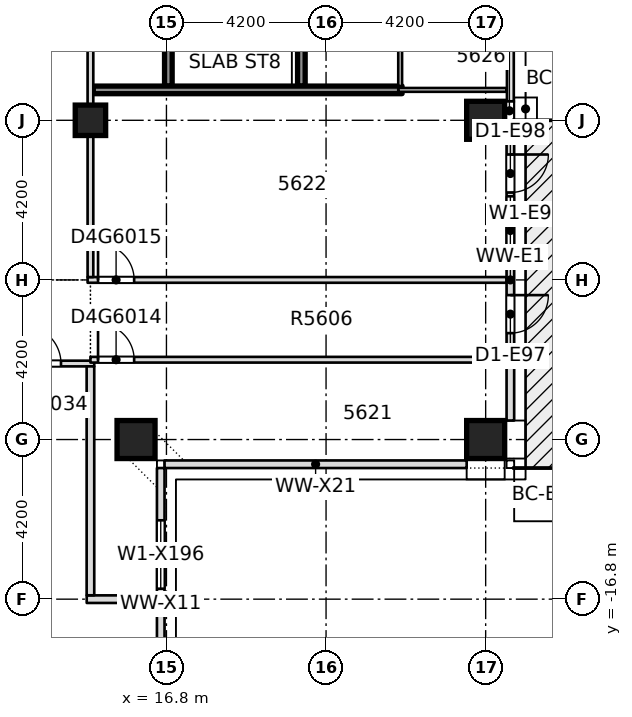
"""IFC4 building model, lengths in metres.
Left out: names, types, materials, properties, quantities, classifications, styles, units other than length and angle.
Written with IfcOpenShell. Run it as: python <this file> out.ifc"""

import sys

from ifc_helpers import new_model, si_unit, direction, frame, frame_2d, origin, origin_2d, place, context, subcontext, project, spatial, rectangle, extrude, element, fill, save


model = new_model("IFC4")
c1 = context("Model", 3, precision=1e-05, world=origin(), true_north=direction((0.0, 1.0)))
c2 = subcontext(c1, "Body", "Model", "MODEL_VIEW")
j1 = project(units=[si_unit("LENGTHUNIT", "METRE"), si_unit("PLANEANGLEUNIT", "RADIAN")], contexts=[c1])
p1 = place(None, origin())
s1 = spatial("IfcSite", under=j1, at=p1, CompositionType="ELEMENT")
p2 = place(p1, origin())
s2 = spatial("IfcBuilding", under=s1, at=p2, CompositionType="ELEMENT")
p3 = place(p2, frame((0.0, 0.0, 213.5)))
s3 = spatial("IfcBuildingStorey", under=s2, at=p3, CompositionType="ELEMENT", Elevation=213.5)
p4 = place(p3, frame((16.0, -12.6, -0.4), z_axis=(0.0, 0.0, 1.0), x_axis=(1.0, 0.0, 0.0)))
e1 = element("IfcColumn", 1, at=p4, inside=s3, PredefinedType="COLUMN", context=c2, shape_type="SweptSolid", body=[
    extrude(rectangle(XDim=1.0, YDim=1.0, at=origin_2d()), origin(), (0.0, 0.0, 1.0), 3.85),
])
for number, where, z_axis, x_axis in (
    (2, (25.2, -12.6, -0.4), (0.0, 0.0, 1.0), (1.0, 0.0, 0.0)),
    (3, (25.2, -4.2, -0.4), (0.0, 0.0, 1.0), (1.0, 0.0, 0.0)),
):
    element("IfcColumn", number, at=place(p3, frame(where, z_axis=z_axis, x_axis=x_axis)), inside=s3, PredefinedType="COLUMN", context=c2, shape_type="SweptSolid", body=[
        extrude(rectangle(XDim=1.0, YDim=1.0, at=origin_2d()), origin(), (0.0, 0.0, 1.0), 3.4),
    ])
p5 = place(p3, frame((14.8, -4.2, -0.4), z_axis=(0.0, 0.0, 1.0), x_axis=(1.0, 0.0, 0.0)))
e4 = element("IfcColumn", 4, at=p5, inside=s3, PredefinedType="COLUMN", context=c2, shape_type="SweptSolid", body=[
    extrude(rectangle(XDim=0.8, YDim=0.8, at=origin_2d()), origin(), (0.0, 0.0, 1.0), 3.85),
])
p6 = place(p3, frame((14.702, -16.8, 0.0), z_axis=(0.0, 0.0, 1.0), x_axis=(1.0, 0.0, 0.0)))
e5 = element("IfcWall", 5, at=p6, inside=s3, PredefinedType="PARTITIONING", context=c2, shape_type="SweptSolid", body=[
    extrude(rectangle(XDim=1.848, YDim=0.2, at=frame_2d((0.924, 0.0))), origin(), (0.0, 0.0, 1.0), 3.0),
])
p7 = place(p3, frame((-5.9, -10.6, 0.0), z_axis=(0.0, 0.0, 1.0), x_axis=(1.0, 0.0, 0.0)))
e6 = element("IfcWall", 6, at=p7, inside=s3, PredefinedType="PARTITIONING", context=c2, shape_type="SweptSolid", body=[
    extrude(rectangle(XDim=20.8, YDim=0.15, at=frame_2d((10.4, 0.0))), origin(), (0.0, 0.0, 1.0), 3.0),
])
p8 = place(p7, frame((1.575, 0.0, 0.0)))
e7 = element("IfcOpeningElement", 7, at=p8, cuts=e6, PredefinedType="OPENING", context=c2, shape_type="SweptSolid", body=[
    extrude(rectangle(XDim=0.95, YDim=2.1, at=frame_2d((0.475, 1.05))), frame((0.0, 0.085, 0.0), z_axis=(0.0, -1.0, 0.0), x_axis=(1.0, 0.0, 0.0)), (0.0, 0.0, 1.0), 0.17),
])
p9 = place(p7, frame((10.625, 0.0, 0.0)))
e8 = element("IfcOpeningElement", 8, at=p9, cuts=e6, PredefinedType="OPENING", context=c2, shape_type="SweptSolid", body=[
    extrude(rectangle(XDim=0.95, YDim=2.1, at=frame_2d((0.475, 1.05))), frame((0.0, 0.085, 0.0), z_axis=(0.0, -1.0, 0.0), x_axis=(1.0, 0.0, 0.0)), (0.0, 0.0, 1.0), 0.17),
])
p10 = place(p7, frame((6.4, 0.0, 0.0)))
e9 = element("IfcOpeningElement", 9, at=p10, cuts=e6, PredefinedType="OPENING", context=c2, shape_type="SweptSolid", body=[
    extrude(rectangle(XDim=1.1, YDim=2.1, at=frame_2d((0.55, 1.05))), frame((0.0, 0.085, 0.0), z_axis=(0.0, -1.0, 0.0), x_axis=(1.0, 0.0, 0.0)), (0.0, 0.0, 1.0), 0.17),
])
p11 = place(p7, frame((15.75, 0.0, 0.0)))
e10 = element("IfcOpeningElement", 10, at=p11, cuts=e6, PredefinedType="OPENING", context=c2, shape_type="SweptSolid", body=[
    extrude(rectangle(XDim=1.1, YDim=2.1, at=frame_2d((0.55, 1.05))), frame((0.0, 0.085, 0.0), z_axis=(0.0, -1.0, 0.0), x_axis=(1.0, 0.0, 0.0)), (0.0, 0.0, 1.0), 0.17),
])
p12 = place(p7, frame((18.925, 0.0, 0.0)))
e11 = element("IfcOpeningElement", 11, at=p12, cuts=e6, PredefinedType="OPENING", context=c2, shape_type="SweptSolid", body=[
    extrude(rectangle(XDim=1.0, YDim=2.1, at=frame_2d((0.5, 1.05))), frame((0.0, 0.085, 0.0), z_axis=(0.0, -1.0, 0.0), x_axis=(1.0, 0.0, 0.0)), (0.0, 0.0, 1.0), 0.17),
])
p13 = place(p3, frame((14.8, -10.5, 0.0), z_axis=(0.0, 0.0, 1.0), x_axis=(1.0, 0.0, 0.0)))
e12 = element("IfcWall", 12, at=p13, inside=s3, PredefinedType="PARTITIONING", context=c2, shape_type="SweptSolid", body=[
    extrude(rectangle(XDim=10.95, YDim=0.15, at=frame_2d((5.475, 0.0))), origin(), (0.0, 0.0, 1.0), 3.0),
])
p14 = place(p13, frame((0.2, 0.0, 0.0)))
e13 = element("IfcOpeningElement", 13, at=p14, cuts=e12, PredefinedType="OPENING", context=c2, shape_type="SweptSolid", body=[
    extrude(rectangle(XDim=0.95, YDim=2.1, at=frame_2d((0.475, 1.05))), frame((0.0, 0.085, 0.0), z_axis=(0.0, -1.0, 0.0), x_axis=(1.0, 0.0, 0.0)), (0.0, 0.0, 1.0), 0.17),
])
p15 = place(p3, frame((14.725, -8.4, 0.0), z_axis=(0.0, 0.0, 1.0), x_axis=(1.0, 0.0, 0.0)))
e14 = element("IfcWall", 14, at=p15, inside=s3, PredefinedType="PARTITIONING", context=c2, shape_type="SweptSolid", body=[
    extrude(rectangle(XDim=11.025, YDim=0.15, at=frame_2d((5.512, 0.0))), origin(), (0.0, 0.0, 1.0), 3.0),
])
p16 = place(p15, frame((0.275, 0.0, 0.0)))
e15 = element("IfcOpeningElement", 15, at=p16, cuts=e14, PredefinedType="OPENING", context=c2, shape_type="SweptSolid", body=[
    extrude(rectangle(XDim=0.95, YDim=2.1, at=frame_2d((0.475, 1.05))), frame((0.0, 0.085, 0.0), z_axis=(0.0, -1.0, 0.0), x_axis=(1.0, 0.0, 0.0)), (0.0, 0.0, 1.0), 0.17),
])
p17 = place(p3, frame((22.9, -3.4, 0.0), z_axis=(0.0, 0.0, 1.0), x_axis=(1.0, 0.0, 0.0)))
e16 = element("IfcWall", 16, at=p17, inside=s3, PredefinedType="PARTITIONING", context=c2, shape_type="SweptSolid", body=[
    extrude(rectangle(XDim=2.85, YDim=0.1, at=frame_2d((1.425, 0.0))), origin(), (0.0, 0.0, 1.0), 3.0),
])
p18 = place(p3, frame((14.8, -16.698, 0.0), z_axis=(0.0, 0.0, 1.0), x_axis=(0.0, 1.0, 0.0)))
e17 = element("IfcWall", 17, at=p18, inside=s3, PredefinedType="PARTITIONING", context=c2, shape_type="SweptSolid", body=[
    extrude(rectangle(XDim=6.023, YDim=0.2, at=frame_2d((3.011, 0.0))), origin(), (0.0, 0.0, 1.0), 3.0),
])
p19 = place(p3, frame((14.8, -8.325, 0.0), z_axis=(0.0, 0.0, 1.0), x_axis=(0.0, 1.0, 0.0)))
e18 = element("IfcWall", 18, at=p19, inside=s3, PredefinedType="PARTITIONING", context=c2, shape_type="SweptSolid", body=[
    extrude(rectangle(XDim=18.75, YDim=0.15, at=frame_2d((9.375, 0.0))), origin(), (0.0, 0.0, 1.0), 3.0),
])
p20 = place(p19, frame((7.775, 0.0, 0.0)))
e19 = element("IfcOpeningElement", 19, at=p20, cuts=e18, PredefinedType="OPENING", context=c2, shape_type="SweptSolid", body=[
    extrude(rectangle(XDim=1.1, YDim=2.1, at=frame_2d((0.55, 1.05))), frame((0.0, 0.085, 0.0), z_axis=(0.0, -1.0, 0.0), x_axis=(1.0, 0.0, 0.0)), (0.0, 0.0, 1.0), 0.17),
])
p21 = place(p3, frame((16.85, -3.3, 0.0), z_axis=(0.0, 0.0, 1.0), x_axis=(0.0, 1.0, 0.0)))
e20 = element("IfcWall", 20, at=p21, inside=s3, PredefinedType="SOLIDWALL", context=c2, shape_type="SweptSolid", body=[
    extrude(rectangle(XDim=6.6, YDim=0.2, at=frame_2d((3.3, 0.0))), origin(), (0.0, 0.0, 1.0), 3.0),
])
p22 = place(p21, frame((5.1, 0.0, 0.0)))
e21 = element("IfcOpeningElement", 21, at=p22, cuts=e20, PredefinedType="OPENING", context=c2, shape_type="SweptSolid", body=[
    extrude(rectangle(XDim=1.2, YDim=2.1, at=frame_2d((0.6, 1.05))), frame((0.0, 0.11, 0.0), z_axis=(0.0, -1.0, 0.0), x_axis=(1.0, 0.0, 0.0)), (0.0, 0.0, 1.0), 0.22),
])
p23 = place(p3, frame((20.35, -3.3, 0.0), z_axis=(0.0, 0.0, 1.0), x_axis=(0.0, 1.0, 0.0)))
e22 = element("IfcWall", 22, at=p23, inside=s3, PredefinedType="SOLIDWALL", context=c2, shape_type="SweptSolid", body=[
    extrude(rectangle(XDim=6.6, YDim=0.2, at=frame_2d((3.3, 0.0))), origin(), (0.0, 0.0, 1.0), 3.0),
])
p24 = place(p3, frame((22.95, -3.3, 0.0), z_axis=(0.0, 0.0, 1.0), x_axis=(0.0, 1.0, 0.0)))
e23 = element("IfcWall", 23, at=p24, inside=s3, PredefinedType="PARTITIONING", context=c2, shape_type="SweptSolid", body=[
    extrude(rectangle(XDim=2.55, YDim=0.1, at=frame_2d((1.275, 0.0))), origin(), (0.0, 0.0, 1.0), 3.0),
])
p25 = place(p3, frame((16.65, -20.5, 0.0), z_axis=(0.0, 0.0, 1.0), x_axis=(0.0, 1.0, 0.0)))
e24 = element("IfcWall", 24, at=p25, inside=s3, PredefinedType="STANDARD", context=c2, shape_type="SweptSolid", body=[
    extrude(rectangle(XDim=7.15, YDim=0.2, at=frame_2d((3.575, 0.0))), origin(), (0.0, 0.0, 1.0), 3.0),
])
p26 = place(p25, frame((0.4, 0.0, 0.2)))
e25 = element("IfcOpeningElement", 25, at=p26, cuts=e24, PredefinedType="OPENING", context=c2, shape_type="SweptSolid", body=[
    extrude(rectangle(XDim=1.8, YDim=2.65, at=frame_2d((0.9, 1.325))), frame((0.0, 0.11, 0.0), z_axis=(0.0, -1.0, 0.0), x_axis=(1.0, 0.0, 0.0)), (0.0, 0.0, 1.0), 0.22),
])
p27 = place(p25, frame((3.975, 0.0, 0.2)))
e26 = element("IfcOpeningElement", 26, at=p27, cuts=e24, PredefinedType="OPENING", context=c2, shape_type="SweptSolid", body=[
    extrude(rectangle(XDim=1.8, YDim=2.65, at=frame_2d((0.9, 1.325))), frame((0.0, 0.11, 0.0), z_axis=(0.0, -1.0, 0.0), x_axis=(1.0, 0.0, 0.0)), (0.0, 0.0, 1.0), 0.22),
])
p28 = place(p3, frame((16.75, -13.25, 0.0), z_axis=(0.0, 0.0, 1.0), x_axis=(1.0, 0.0, 0.0)))
e27 = element("IfcWall", 27, at=p28, inside=s3, PredefinedType="STANDARD", context=c2, shape_type="SweptSolid", body=[
    extrude(rectangle(XDim=7.95, YDim=0.2, at=frame_2d((3.975, 0.0))), origin(), (0.0, 0.0, 1.0), 3.0),
])
p29 = place(p3, frame((25.85, -12.1, 0.0), z_axis=(0.0, 0.0, 1.0), x_axis=(0.0, 1.0, 0.0)))
e28 = element("IfcWall", 28, at=p29, inside=s3, PredefinedType="STANDARD", context=c2, shape_type="SweptSolid", body=[
    extrude(rectangle(XDim=7.4, YDim=0.2, at=frame_2d((3.7, 0.0))), origin(), (0.0, 0.0, 1.0), 3.0),
])
p30 = place(p29, frame((2.3, 0.0, 0.0)))
e29 = element("IfcOpeningElement", 29, at=p30, cuts=e28, PredefinedType="OPENING", context=c2, shape_type="SweptSolid", body=[
    extrude(rectangle(XDim=1.0, YDim=2.4, at=frame_2d((0.5, 1.2))), frame((0.0, 0.11, 0.0), z_axis=(0.0, -1.0, 0.0), x_axis=(1.0, 0.0, 0.0)), (0.0, 0.0, 1.0), 0.22),
])
p31 = place(p29, frame((4.1, 0.0, 0.2)))
e30 = element("IfcOpeningElement", 30, at=p31, cuts=e28, PredefinedType="OPENING", context=c2, shape_type="SweptSolid", body=[
    extrude(rectangle(XDim=1.8, YDim=2.65, at=frame_2d((0.9, 1.325))), frame((0.0, 0.11, 0.0), z_axis=(0.0, -1.0, 0.0), x_axis=(1.0, 0.0, 0.0)), (0.0, 0.0, 1.0), 0.22),
])
p32 = place(p29, frame((6.0, 0.0, 0.0)))
e31 = element("IfcOpeningElement", 31, at=p32, cuts=e28, PredefinedType="OPENING", context=c2, shape_type="SweptSolid", body=[
    extrude(rectangle(XDim=1.0, YDim=2.4, at=frame_2d((0.5, 1.2))), frame((0.0, 0.11, 0.0), z_axis=(0.0, -1.0, 0.0), x_axis=(1.0, 0.0, 0.0)), (0.0, 0.0, 1.0), 0.22),
])
p33 = place(p3, frame((14.875, -3.4, 0.0), z_axis=(0.0, 0.0, 1.0), x_axis=(1.0, 0.0, 0.0)))
e32 = element("IfcWall", 32, at=p33, inside=s3, PredefinedType="SOLIDWALL", context=c2, shape_type="SweptSolid", body=[
    extrude(rectangle(XDim=8.125, YDim=0.2, at=frame_2d((4.062, 0.0))), origin(), (0.0, 0.0, 1.0), 3.0),
])
p34 = place(p14, origin())
e33 = element("IfcDoor", 33, at=p34, inside=s3, OperationType="SINGLE_SWING_RIGHT", PredefinedType="DOOR", context=c2, shape_type="SweptSolid", body=[
    extrude(rectangle(XDim=0.95, YDim=2.1, at=frame_2d((0.475, 1.05))), frame((0.0, 0.025, 0.0), z_axis=(0.0, -1.0, 0.0), x_axis=(1.0, 0.0, 0.0)), (0.0, 0.0, 1.0), 0.05),
])
fill(e13, e33)
p35 = place(p16, origin())
e34 = element("IfcDoor", 34, at=p35, inside=s3, OperationType="SINGLE_SWING_LEFT", PredefinedType="DOOR", context=c2, shape_type="SweptSolid", body=[
    extrude(rectangle(XDim=0.95, YDim=2.1, at=frame_2d((0.475, 1.05))), frame((0.0, 0.025, 0.0), z_axis=(0.0, -1.0, 0.0), x_axis=(1.0, 0.0, 0.0)), (0.0, 0.0, 1.0), 0.05),
])
fill(e15, e34)
p36 = place(p12, origin())
e35 = element("IfcDoor", 35, at=p36, inside=s3, OperationType="SINGLE_SWING_LEFT", PredefinedType="DOOR", context=c2, shape_type="SweptSolid", body=[
    extrude(rectangle(XDim=1.0, YDim=2.1, at=frame_2d((0.5, 1.05))), frame((0.0, 0.025, 0.0), z_axis=(0.0, -1.0, 0.0), x_axis=(1.0, 0.0, 0.0)), (0.0, 0.0, 1.0), 0.05),
])
fill(e11, e35)
p37 = place(p27, origin())
e36 = element("IfcWindow", 36, at=p37, inside=s3, PartitioningType="SINGLE_PANEL", PredefinedType="WINDOW", context=c2, shape_type="SweptSolid", body=[
    extrude(rectangle(XDim=1.8, YDim=2.65, at=frame_2d((0.9, 1.325))), frame((0.0, 0.03, 0.0), z_axis=(0.0, -1.0, 0.0), x_axis=(1.0, 0.0, 0.0)), (0.0, 0.0, 1.0), 0.06),
])
fill(e26, e36)
p38 = place(p30, origin())
e37 = element("IfcDoor", 37, at=p38, inside=s3, OperationType="SINGLE_SWING_LEFT", PredefinedType="DOOR", context=c2, shape_type="SweptSolid", body=[
    extrude(rectangle(XDim=1.0, YDim=2.4, at=frame_2d((0.5, 1.2))), frame((0.0, 0.025, 0.0), z_axis=(0.0, -1.0, 0.0), x_axis=(1.0, 0.0, 0.0)), (0.0, 0.0, 1.0), 0.05),
])
fill(e29, e37)
p39 = place(p31, origin())
e38 = element("IfcWindow", 38, at=p39, inside=s3, PartitioningType="SINGLE_PANEL", PredefinedType="WINDOW", context=c2, shape_type="SweptSolid", body=[
    extrude(rectangle(XDim=1.8, YDim=2.65, at=frame_2d((0.9, 1.325))), frame((0.0, 0.03, 0.0), z_axis=(0.0, -1.0, 0.0), x_axis=(1.0, 0.0, 0.0)), (0.0, 0.0, 1.0), 0.06),
])
fill(e30, e38)
p40 = place(p32, origin())
e39 = element("IfcDoor", 39, at=p40, inside=s3, OperationType="SINGLE_SWING_LEFT", PredefinedType="DOOR", context=c2, shape_type="SweptSolid", body=[
    extrude(rectangle(XDim=1.0, YDim=2.4, at=frame_2d((0.5, 1.2))), frame((0.0, 0.025, 0.0), z_axis=(0.0, -1.0, 0.0), x_axis=(1.0, 0.0, 0.0)), (0.0, 0.0, 1.0), 0.05),
])
fill(e31, e39)
save(model, sys.argv[1])
